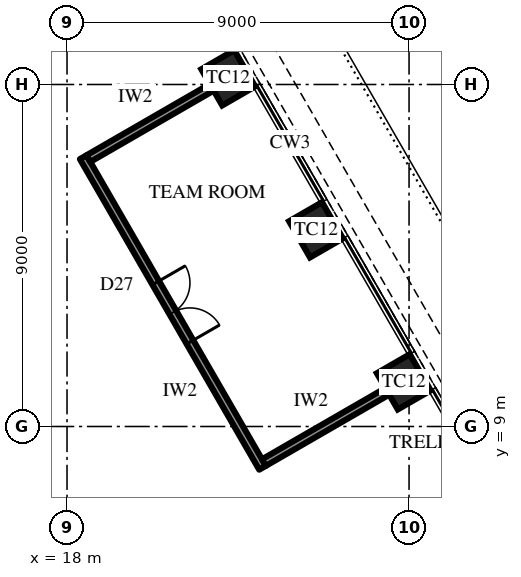
"""IFC4 building model, lengths in metres.
Left out: names, types, materials, properties, quantities, classifications, styles, units other than length and angle.
Written with IfcOpenShell. Run it as: python <this file> out.ifc"""

import sys

from ifc_helpers import new_model, si_unit, direction, frame, frame_2d, origin, origin_2d, place, context, subcontext, project, spatial, rectangle, extrude, element, fill, save


model = new_model("IFC4")
c1 = context("Model", 3, precision=1e-05, world=origin(), true_north=direction((0.0, 1.0)))
c2 = subcontext(c1, "Body", "Model", "MODEL_VIEW")
j1 = project(units=[si_unit("LENGTHUNIT", "METRE"), si_unit("PLANEANGLEUNIT", "RADIAN")], contexts=[c1])
p1 = place(None, origin())
s1 = spatial("IfcSite", under=j1, at=p1, CompositionType="ELEMENT")
p2 = place(p1, origin())
s2 = spatial("IfcBuilding", under=s1, at=p2, CompositionType="ELEMENT")
p3 = place(p2, frame((0.0, 0.0, 286.9)))
s3 = spatial("IfcBuildingStorey", under=s2, at=p3, CompositionType="ELEMENT", Elevation=286.9)
for number, where, z_axis, x_axis in (
    (1, (26.861, 10.175, 0.0), (0.0, 0.0, 1.0), (-0.5, 0.866, 0.0)),
    (2, (24.552, 14.175, 0.0), (0.0, 0.0, 1.0), (-0.5, 0.866, 0.0)),
    (3, (22.242, 18.175, 0.0), (0.0, 0.0, 1.0), (-0.5, 0.866, 0.0)),
):
    element("IfcColumn", number, at=place(p3, frame(where, z_axis=z_axis, x_axis=x_axis)), inside=s3, PredefinedType="COLUMN", context=c2, shape_type="SweptSolid", body=[
        extrude(rectangle(XDim=1.1, YDim=1.0, at=origin_2d()), origin(), (0.0, 0.0, 1.0), 4.2),
    ])
p4 = place(p3, frame((23.144, 7.913, 0.0), z_axis=(0.0, 0.0, 1.0), x_axis=(-0.499989672313, 0.866031366395, 0.0)))
e4 = element("IfcWall", 4, at=p4, inside=s3, PredefinedType="PARTITIONING", context=c2, shape_type="SweptSolid", body=[
    extrude(rectangle(XDim=9.438, YDim=0.2, at=frame_2d((4.719, 0.0))), origin(), (0.0, 0.0, 1.0), 4.0),
])
p5 = place(p4, frame((3.819, 0.0, 0.0)))
e5 = element("IfcOpeningElement", 5, at=p5, cuts=e4, PredefinedType="OPENING", context=c2, shape_type="SweptSolid", body=[
    extrude(rectangle(XDim=1.8, YDim=2.4, at=frame_2d((0.9, 1.2))), frame((0.0, 0.11, 0.0), z_axis=(0.0, -1.0, 0.0), x_axis=(1.0, 0.0, 0.0)), (0.0, 0.0, 1.0), 0.22),
])
for number, where, z_axis, x_axis in (
    (6, (23.181, 8.05, 0.0), (0.0, 0.0, 1.0), (0.866, 0.5, 0.0)),
    (7, (18.562, 16.05, 0.0), (0.0, 0.0, 1.0), (0.866, 0.5, 0.0)),
):
    element("IfcWall", number, at=place(p3, frame(where, z_axis=z_axis, x_axis=x_axis)), inside=s3, PredefinedType="PARTITIONING", context=c2, shape_type="SweptSolid", body=[
        extrude(rectangle(XDim=3.75, YDim=0.2, at=frame_2d((1.875, 0.0))), origin(), (0.0, 0.0, 1.0), 3.082),
    ])
p6 = place(p5, frame((1.8, 0.0, 0.0), z_axis=(0.0, 0.0, 1.0), x_axis=(-1.0, 0.0, 0.0)))
e8 = element("IfcDoor", 8, at=p6, inside=s3, OperationType="DOUBLE_DOOR_SINGLE_SWING", PredefinedType="DOOR", context=c2, shape_type="SweptSolid", body=[
    extrude(rectangle(XDim=1.8, YDim=2.4, at=frame_2d((0.9, 1.2))), frame((0.0, 0.025, 0.0), z_axis=(0.0, -1.0, 0.0), x_axis=(1.0, 0.0, 0.0)), (0.0, 0.0, 1.0), 0.05),
])
fill(e5, e8)
save(model, sys.argv[1])
